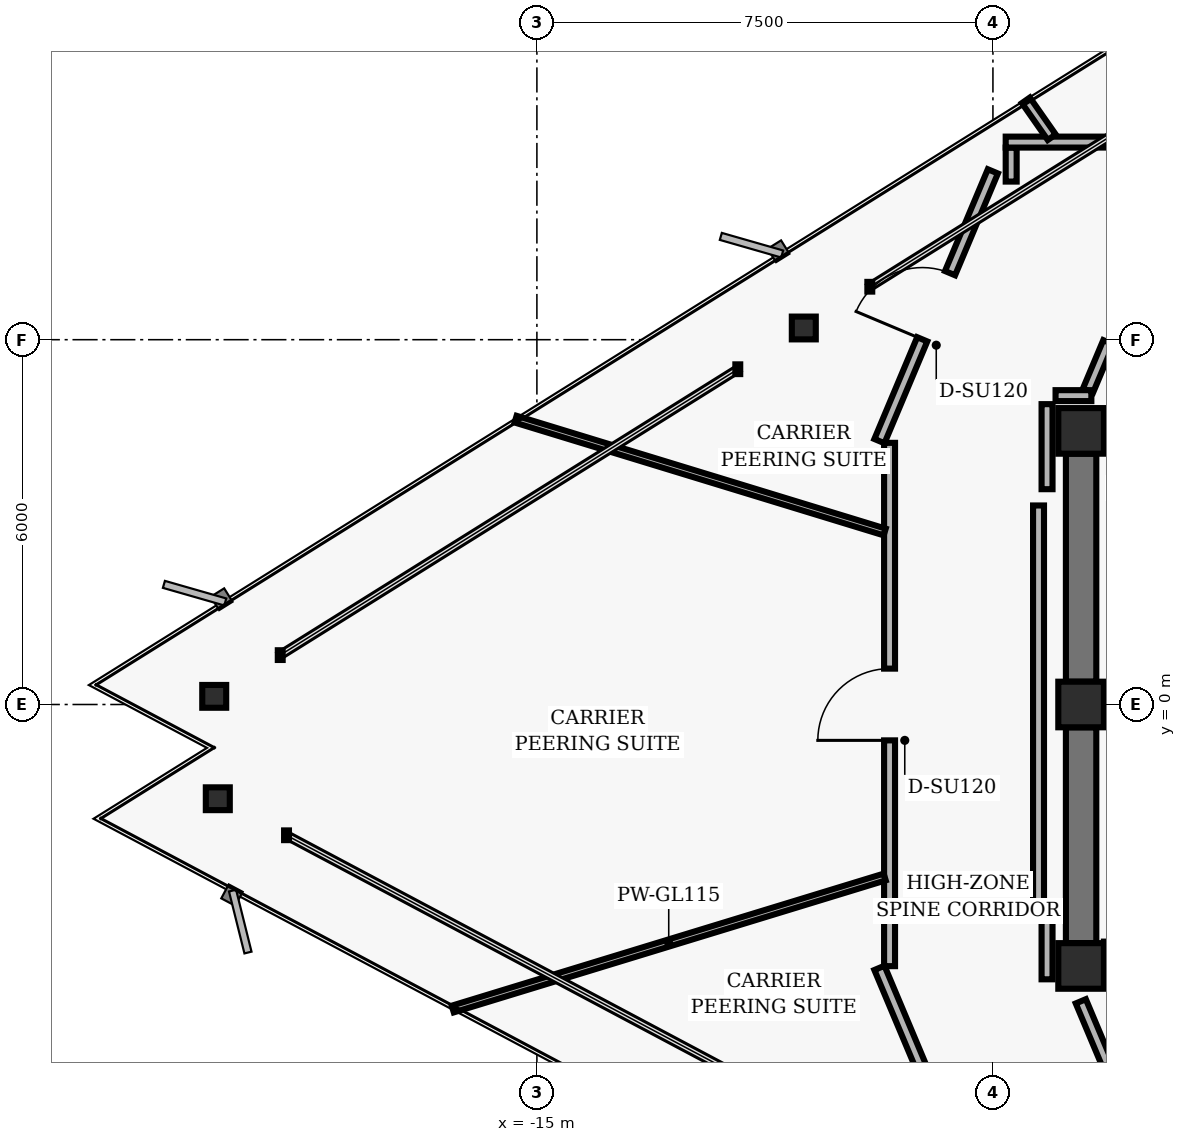
"""IFC4 building model, lengths in metres.
Left out: names, types, materials, properties, quantities, classifications, styles, units other than length and angle.
Written with IfcOpenShell. Run it as: python <this file> out.ifc"""

import sys

from ifc_helpers import new_model, si_unit, direction, frame, frame_2d, origin, origin_2d, place, context, subcontext, project, spatial, rectangle, hollow_rectangle, i_section, extrude, element, fill, save


model = new_model("IFC4")
c1 = context("Model", 3, precision=1e-05, world=origin(), true_north=direction((0.0, 1.0)))
c2 = subcontext(c1, "Body", "Model", "MODEL_VIEW")
j1 = project(units=[si_unit("LENGTHUNIT", "METRE"), si_unit("PLANEANGLEUNIT", "RADIAN")], contexts=[c1])
p1 = place(None, origin())
s1 = spatial("IfcSite", under=j1, at=p1, CompositionType="ELEMENT")
p2 = place(p1, origin())
s2 = spatial("IfcBuilding", under=s1, at=p2, CompositionType="ELEMENT")
p3 = place(p2, frame((0.0, 0.0, 208.8)))
s3 = spatial("IfcBuildingStorey", under=s2, at=p3, CompositionType="ELEMENT", Elevation=208.8)
for number, where, z_axis, x_axis in (
    (1, (-6.05, 4.5, 0.0), (0.0, 0.0, 1.0), (1.0, 0.0, 0.0)),
    (2, (-6.05, 0.0, 0.0), (0.0, 0.0, 1.0), (1.0, 0.0, 0.0)),
    (3, (-6.05, -4.3, 0.0), (0.0, 0.0, 1.0), (1.0, 0.0, 0.0)),
):
    element("IfcColumn", number, at=place(p3, frame(where, z_axis=z_axis, x_axis=x_axis)), inside=s3, PredefinedType="COLUMN", context=c2, shape_type="SweptSolid", body=[
        extrude(hollow_rectangle(XDim=0.75, YDim=0.75, WallThickness=0.05, InnerFilletRadius=0.02, OuterFilletRadius=0.04, at=origin_2d()), origin(), (0.0, 0.0, 1.0), 3.04),
    ])
p4 = place(p3, frame((-6.05, 0.375, 0.0), z_axis=(0.0, 0.0, 1.0), x_axis=(0.0, 1.0, 0.0)))
e4 = element("IfcWall", 4, at=p4, inside=s3, PredefinedType="SHEAR", context=c2, shape_type="SweptSolid", body=[
    extrude(rectangle(XDim=3.75, YDim=0.5, at=frame_2d((1.875, 0.0))), origin(), (0.0, 0.0, 1.0), 2.798),
])
p5 = place(p3, frame((-6.05, -3.925, 0.0), z_axis=(0.0, 0.0, 1.0), x_axis=(0.0, 1.0, 0.0)))
e5 = element("IfcWall", 5, at=p5, inside=s3, PredefinedType="SHEAR", context=c2, shape_type="SweptSolid", body=[
    extrude(rectangle(XDim=3.55, YDim=0.5, at=frame_2d((1.775, 0.0))), origin(), (0.0, 0.0, 1.0), 2.798),
])
p6 = place(p3, frame((-5.675, -4.1, 0.0), z_axis=(0.0, 0.0, 1.0), x_axis=(1.0, 0.0, 0.0)))
e6 = element("IfcWall", 6, at=p6, inside=s3, PredefinedType="SHEAR", context=c2, shape_type="SweptSolid", body=[
    extrude(rectangle(XDim=11.35, YDim=0.4, at=frame_2d((5.675, 0.0))), origin(), (0.0, 0.0, 1.0), 2.798),
])
p7 = place(p6, frame((1.405, 0.0, 0.0)))
e7 = element("IfcOpeningElement", 7, at=p7, cuts=e6, PredefinedType="OPENING", context=c2, shape_type="SweptSolid", body=[
    extrude(rectangle(XDim=1.1, YDim=2.04, at=frame_2d((0.55, 1.02))), frame((0.0, 0.21, 0.0), z_axis=(0.0, -1.0, 0.0), x_axis=(1.0, 0.0, 0.0)), (0.0, 0.0, 1.0), 0.42),
])
p8 = place(p6, frame((8.845, 0.0, 0.0)))
e8 = element("IfcOpeningElement", 8, at=p8, cuts=e6, PredefinedType="OPENING", context=c2, shape_type="SweptSolid", body=[
    extrude(rectangle(XDim=1.1, YDim=2.04, at=frame_2d((0.55, 1.02))), frame((0.0, 0.21, 0.0), z_axis=(0.0, -1.0, 0.0), x_axis=(1.0, 0.0, 0.0)), (0.0, 0.0, 1.0), 0.42),
])
p9 = place(p6, frame((4.145, 0.0, 0.0)))
e9 = element("IfcOpeningElement", 9, at=p9, cuts=e6, PredefinedType="OPENING", context=c2, shape_type="SweptSolid", body=[
    extrude(rectangle(XDim=1.06, YDim=2.04, at=frame_2d((0.53, 1.02))), frame((0.0, 0.21, 0.0), z_axis=(0.0, -1.0, 0.0), x_axis=(1.0, 0.0, 0.0)), (0.0, 0.0, 1.0), 0.42),
])
p10 = place(p6, frame((6.145, 0.0, 0.0)))
e10 = element("IfcOpeningElement", 10, at=p10, cuts=e6, PredefinedType="OPENING", context=c2, shape_type="SweptSolid", body=[
    extrude(rectangle(XDim=1.06, YDim=2.04, at=frame_2d((0.53, 1.02))), frame((0.0, 0.21, 0.0), z_axis=(0.0, -1.0, 0.0), x_axis=(1.0, 0.0, 0.0)), (0.0, 0.0, 1.0), 0.42),
])
p11 = place(p3, frame((-5.675, 4.5, 0.0), z_axis=(0.0, 0.0, 1.0), x_axis=(1.0, 0.0, 0.0)))
e11 = element("IfcWall", 11, at=p11, inside=s3, PredefinedType="SHEAR", context=c2, shape_type="SweptSolid", body=[
    extrude(rectangle(XDim=3.625, YDim=0.5, at=frame_2d((1.812, 0.0))), origin(), (0.0, 0.0, 1.0), 2.798),
])
for number, where, z_axis, x_axis in (
    (12, (-10.611, 6.193, 0.0), (0.0, 0.0, 1.0), (1.0, 0.0, 0.0)),
    (13, (-20.307, 0.134, 0.0), (0.0, 0.0, 1.0), (1.0, 0.0, 0.0)),
    (14, (-20.248, -1.55, 0.0), (0.0, 0.0, 1.0), (1.0, 0.0, 0.0)),
):
    element("IfcColumn", number, at=place(p3, frame(where, z_axis=z_axis, x_axis=x_axis)), inside=s3, PredefinedType="COLUMN", context=c2, shape_type="SweptSolid", body=[
        extrude(i_section(OverallWidth=0.394, OverallDepth=0.375, WebThickness=0.017, FlangeThickness=0.028, FilletRadius=0.016, at=origin_2d()), origin(), (0.0, 0.0, 1.0), 3.04),
    ])
p12 = place(p3, frame((-7.501, -8.769, 0.0), z_axis=(0.0, 0.0, 1.0), x_axis=(-0.387573945081, 0.921838617706, 0.0)))
e15 = element("IfcWall", 15, at=p12, inside=s3, PredefinedType="PARTITIONING", context=c2, shape_type="SweptSolid", body=[
    extrude(rectangle(XDim=4.813, YDim=0.18, at=frame_2d((2.407, 0.0))), origin(), (0.0, 0.0, 1.0), 2.773),
])
p13 = place(p12, frame((1.817, 0.0, 0.0)))
e16 = element("IfcOpeningElement", 16, at=p13, cuts=e15, PredefinedType="OPENING", context=c2, shape_type="SweptSolid", body=[
    extrude(rectangle(XDim=1.18, YDim=2.02, at=frame_2d((0.59, 1.01))), frame((0.0, 0.1, 0.0), z_axis=(0.0, -1.0, 0.0), x_axis=(1.0, 0.0, 0.0)), (0.0, 0.0, 1.0), 0.2),
])
p14 = place(p3, frame((-9.2, -4.303, 0.0), z_axis=(0.0, 0.0, 1.0), x_axis=(0.0, 1.0, 0.0)))
e17 = element("IfcWall", 17, at=p14, inside=s3, PredefinedType="PARTITIONING", context=c2, shape_type="SweptSolid", body=[
    extrude(rectangle(XDim=8.607, YDim=0.18, at=frame_2d((4.303, 0.0))), origin(), (0.0, 0.0, 1.0), 2.773),
])
p15 = place(p14, frame((3.713, 0.0, 0.0)))
e18 = element("IfcOpeningElement", 18, at=p15, cuts=e17, PredefinedType="OPENING", context=c2, shape_type="SweptSolid", body=[
    extrude(rectangle(XDim=1.18, YDim=2.02, at=frame_2d((0.59, 1.01))), frame((0.0, 0.1, 0.0), z_axis=(0.0, -1.0, 0.0), x_axis=(1.0, 0.0, 0.0)), (0.0, 0.0, 1.0), 0.2),
])
p16 = place(p3, frame((-9.367, 4.332, 0.0), z_axis=(0.0, 0.0, 1.0), x_axis=(0.387573945081, 0.921838617706, 0.0)))
e19 = element("IfcWall", 19, at=p16, inside=s3, PredefinedType="PARTITIONING", context=c2, shape_type="SweptSolid", body=[
    extrude(rectangle(XDim=4.813, YDim=0.18, at=frame_2d((2.407, 0.0))), origin(), (0.0, 0.0, 1.0), 2.773),
])
p17 = place(p16, frame((1.817, 0.0, 0.0)))
e20 = element("IfcOpeningElement", 20, at=p17, cuts=e19, PredefinedType="OPENING", context=c2, shape_type="SweptSolid", body=[
    extrude(rectangle(XDim=1.18, YDim=2.02, at=frame_2d((0.59, 1.01))), frame((0.0, 0.1, 0.0), z_axis=(0.0, -1.0, 0.0), x_axis=(1.0, 0.0, 0.0)), (0.0, 0.0, 1.0), 0.2),
])
p18 = place(p3, frame((-7.2, 8.601, 0.0), z_axis=(0.0, 0.0, 1.0), x_axis=(0.0, 1.0, 0.0)))
e21 = element("IfcWall", 21, at=p18, inside=s3, PredefinedType="PARTITIONING", context=c2, shape_type="SweptSolid", body=[
    extrude(rectangle(XDim=0.559, YDim=0.18, at=frame_2d((0.28, 0.0))), origin(), (0.0, 0.0, 1.0), 2.773),
])
p19 = place(p3, frame((-7.29, 9.25, 0.0), z_axis=(0.0, 0.0, 1.0), x_axis=(1.0, 0.0, 0.0)))
e22 = element("IfcWall", 22, at=p19, inside=s3, PredefinedType="PARTITIONING", context=c2, shape_type="SweptSolid", body=[
    extrude(rectangle(XDim=13.3, YDim=0.18, at=frame_2d((6.65, 0.0))), origin(), (0.0, 0.0, 1.0), 2.773),
])
p20 = place(p19, frame((10.148, 0.0, 0.0)))
e23 = element("IfcOpeningElement", 23, at=p20, cuts=e22, PredefinedType="OPENING", context=c2, shape_type="SweptSolid", body=[
    extrude(rectangle(XDim=1.18, YDim=2.02, at=frame_2d((0.59, 1.01))), frame((0.0, 0.1, 0.0), z_axis=(0.0, -1.0, 0.0), x_axis=(1.0, 0.0, 0.0)), (0.0, 0.0, 1.0), 0.2),
])
p21 = place(p19, frame((4.11, 0.0, 0.0)))
e24 = element("IfcOpeningElement", 24, at=p21, cuts=e22, PredefinedType="OPENING", context=c2, shape_type="SweptSolid", body=[
    extrude(rectangle(XDim=0.96, YDim=2.02, at=frame_2d((0.48, 1.01))), frame((0.0, 0.1, 0.0), z_axis=(0.0, -1.0, 0.0), x_axis=(1.0, 0.0, 0.0)), (0.0, 0.0, 1.0), 0.2),
])
p22 = place(p3, frame((-5.602, 5.958, 0.0), z_axis=(0.0, 0.0, 1.0), x_axis=(-0.387588639363, -0.921832439566, 0.0)))
e25 = element("IfcWall", 25, at=p22, inside=s3, PredefinedType="PARTITIONING", context=c2, shape_type="SweptSolid", body=[
    extrude(rectangle(XDim=0.862, YDim=0.18, at=frame_2d((0.431, 0.0))), origin(), (0.0, 0.0, 1.0), 2.773),
])
p23 = place(p3, frame((-5.881, 5.08, 0.0), z_axis=(0.0, 0.0, 1.0), x_axis=(-1.0, 0.0, 0.0)))
e26 = element("IfcWall", 26, at=p23, inside=s3, PredefinedType="PARTITIONING", context=c2, shape_type="SweptSolid", body=[
    extrude(rectangle(XDim=0.589, YDim=0.18, at=frame_2d((0.294, 0.0))), origin(), (0.0, 0.0, 1.0), 2.773),
])
p24 = place(p3, frame((-6.61, 4.94, 0.0), z_axis=(0.0, 0.0, 1.0), x_axis=(0.0, -1.0, 0.0)))
e27 = element("IfcWall", 27, at=p24, inside=s3, PredefinedType="PARTITIONING", context=c2, shape_type="SweptSolid", body=[
    extrude(rectangle(XDim=1.399, YDim=0.18, at=frame_2d((0.699, 0.0))), origin(), (0.0, 0.0, 1.0), 2.773),
])
p25 = place(p3, frame((-6.75, 3.273, 0.0), z_axis=(0.0, 0.0, 1.0), x_axis=(0.0, -1.0, 0.0)))
e28 = element("IfcWall", 28, at=p25, inside=s3, PredefinedType="PARTITIONING", context=c2, shape_type="SweptSolid", body=[
    extrude(rectangle(XDim=6.547, YDim=0.18, at=frame_2d((3.273, 0.0))), origin(), (0.0, 0.0, 1.0), 2.773),
])
p26 = place(p3, frame((-6.61, -3.541, 0.0), z_axis=(0.0, 0.0, 1.0), x_axis=(0.0, -1.0, 0.0)))
e29 = element("IfcWall", 29, at=p26, inside=s3, PredefinedType="PARTITIONING", context=c2, shape_type="SweptSolid", body=[
    extrude(rectangle(XDim=0.979, YDim=0.18, at=frame_2d((0.489, 0.0))), origin(), (0.0, 0.0, 1.0), 2.773),
])
p27 = place(p3, frame((-6.055, -4.882, 0.0), z_axis=(0.0, 0.0, 1.0), x_axis=(0.387579540458, -0.921836265189, 0.0)))
e30 = element("IfcWall", 30, at=p27, inside=s3, PredefinedType="PARTITIONING", context=c2, shape_type="SweptSolid", body=[
    extrude(rectangle(XDim=1.555, YDim=0.18, at=frame_2d((0.777, 0.0))), origin(), (0.0, 0.0, 1.0), 2.253),
])
p28 = place(p3, frame((-9.28, -2.837, 0.0), z_axis=(0.0, 0.0, 1.0), x_axis=(-0.956303337488, -0.292376344307, 0.0)))
e31 = element("IfcWall", 31, at=p28, inside=s3, PredefinedType="MOVABLE", context=c2, shape_type="SweptSolid", body=[
    extrude(rectangle(XDim=7.428, YDim=0.115, at=frame_2d((3.714, 0.0))), origin(), (0.0, 0.0, 1.0), 2.773),
])
p29 = place(p3, frame((-6.533, 9.33, 0.0), z_axis=(0.0, 0.0, 1.0), x_axis=(-0.573639237496, 0.819108066866, 0.0)))
e32 = element("IfcWall", 32, at=p29, inside=s3, PredefinedType="PARTITIONING", context=c2, shape_type="SweptSolid", body=[
    extrude(rectangle(XDim=0.741, YDim=0.16, at=frame_2d((0.371, 0.0))), origin(), (0.0, 0.0, 1.0), 2.773),
])
p30 = place(p3, frame((-9.28, 2.837, 0.0), z_axis=(0.0, 0.0, 1.0), x_axis=(-0.956301397149, 0.292382690682, 0.0)))
e33 = element("IfcWall", 33, at=p30, inside=s3, PredefinedType="MOVABLE", context=c2, shape_type="SweptSolid", body=[
    extrude(rectangle(XDim=6.348, YDim=0.115, at=frame_2d((3.174, 0.0))), origin(), (0.0, 0.0, 1.0), 2.773),
])
p31 = place(p15, origin())
e34 = element("IfcDoor", 34, at=p31, inside=s3, OperationType="SINGLE_SWING_LEFT", PredefinedType="DOOR", context=c2, shape_type="SweptSolid", body=[
    extrude(rectangle(XDim=1.18, YDim=2.02, at=frame_2d((0.59, 1.01))), frame((0.0, 0.025, 0.0), z_axis=(0.0, -1.0, 0.0), x_axis=(1.0, 0.0, 0.0)), (0.0, 0.0, 1.0), 0.05),
])
fill(e18, e34)
p32 = place(p17, origin())
e35 = element("IfcDoor", 35, at=p32, inside=s3, OperationType="SINGLE_SWING_LEFT", PredefinedType="DOOR", context=c2, shape_type="SweptSolid", body=[
    extrude(rectangle(XDim=1.18, YDim=2.02, at=frame_2d((0.59, 1.01))), frame((0.0, 0.025, 0.0), z_axis=(0.0, -1.0, 0.0), x_axis=(1.0, 0.0, 0.0)), (0.0, 0.0, 1.0), 0.05),
])
fill(e20, e35)
save(model, sys.argv[1])
